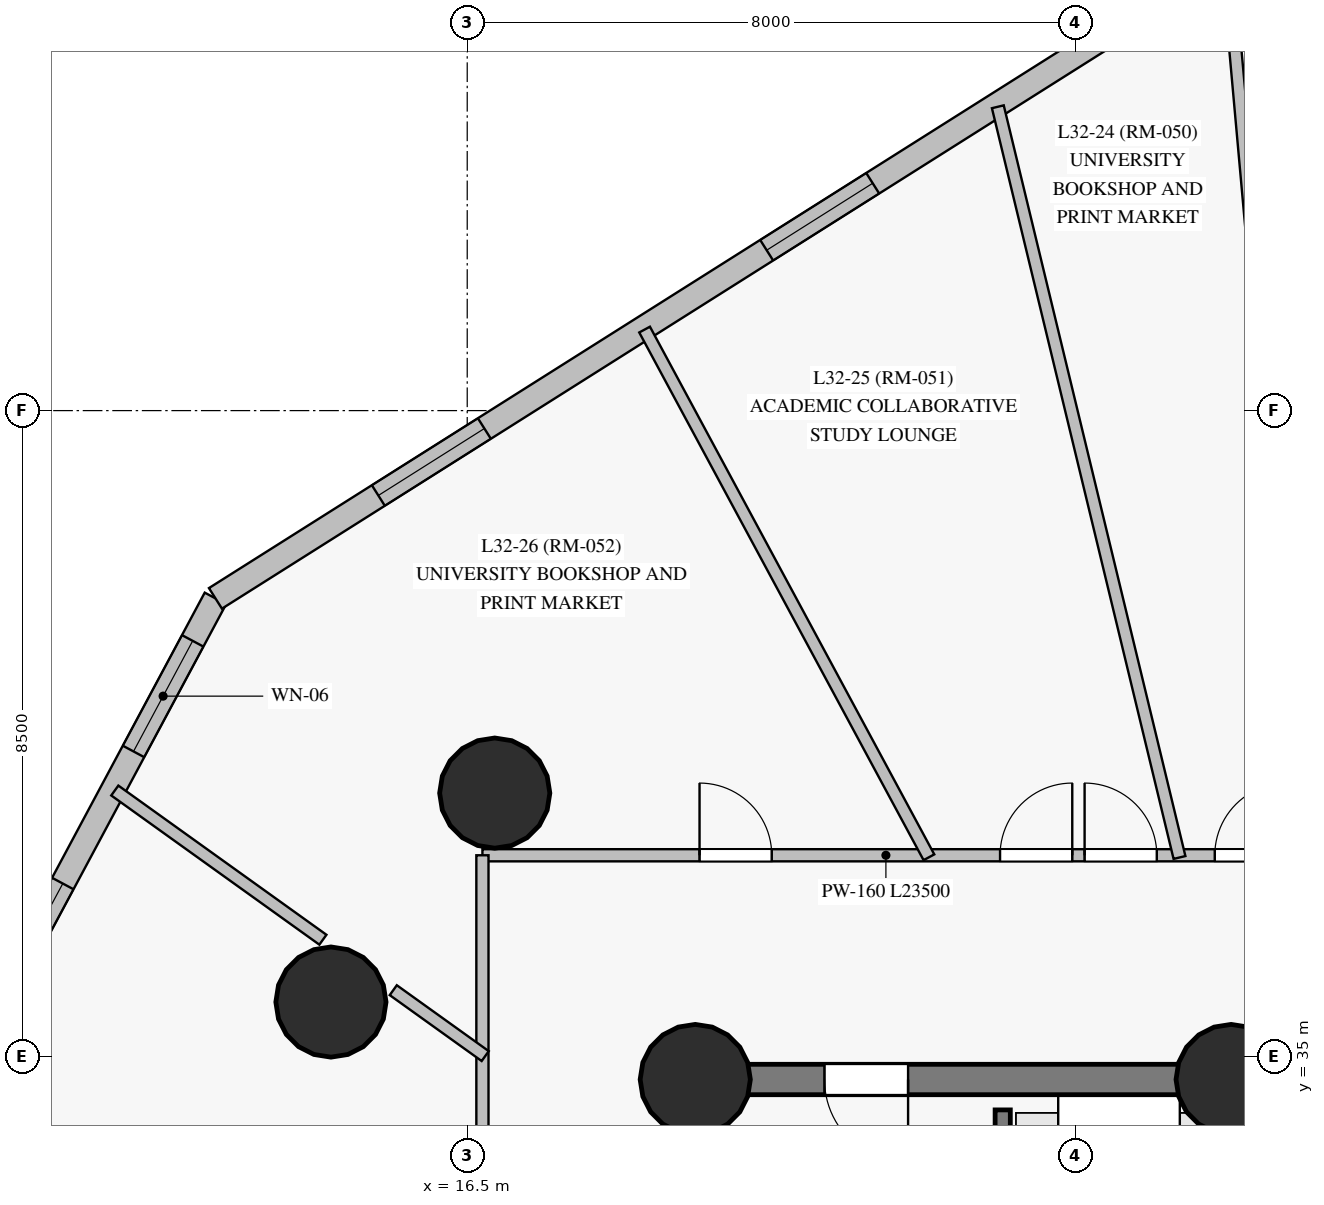
"""IFC4 building model, lengths in metres.
Left out: names, types, materials, properties, quantities, classifications, styles, units other than length and angle.
Written with IfcOpenShell. Run it as: python <this file> out.ifc"""

import sys

from ifc_helpers import new_model, si_unit, direction, frame, frame_2d, origin, origin_with_axes, origin_2d, place, context, subcontext, project, spatial, rectangle, circle, extrude, source, transform, mapped, element, fill, save


model = new_model("IFC4")
c1 = context("Model", 3, precision=1e-05, world=origin(), true_north=direction((0.0, 1.0)))
c2 = subcontext(c1, "Body", "Model", "MODEL_VIEW")
j1 = project(units=[si_unit("LENGTHUNIT", "METRE"), si_unit("PLANEANGLEUNIT", "RADIAN")], contexts=[c1])
p1 = place(None, origin())
s1 = spatial("IfcSite", under=j1, at=p1, CompositionType="ELEMENT")
p2 = place(p1, origin())
s2 = spatial("IfcBuilding", under=s1, at=p2, CompositionType="ELEMENT")
p3 = place(p2, frame((0.0, 0.0, 117.55)))
s3 = spatial("IfcBuildingStorey", under=s2, at=p3, CompositionType="ELEMENT", Elevation=117.55)
p4 = place(p3, frame((37.5, 34.7, 0.0), z_axis=(0.0, 0.0, 1.0), x_axis=(-1.0, 0.0, 0.0)))
e1 = element("IfcWall", 1, at=p4, inside=s3, PredefinedType="SHEAR", context=c2, shape_type="SweptSolid", body=[
    extrude(rectangle(XDim=10.95, YDim=0.4, at=frame_2d((5.475, 0.0))), origin(), (0.0, 0.0, 1.0), 2.825),
])
p5 = place(p4, frame((2.15, 0.0, 0.0)))
e2 = element("IfcOpeningElement", 2, at=p5, cuts=e1, PredefinedType="OPENING", context=c2, shape_type="SweptSolid", body=[
    extrude(rectangle(XDim=1.2, YDim=2.15, at=frame_2d((0.6, 1.075))), frame((0.0, 0.21, 0.0), z_axis=(0.0, -1.0, 0.0), x_axis=(1.0, 0.0, 0.0)), (0.0, 0.0, 1.0), 0.42),
])
p6 = place(p4, frame((6.35, 0.0, 0.0)))
e3 = element("IfcOpeningElement", 3, at=p6, cuts=e1, PredefinedType="OPENING", context=c2, shape_type="SweptSolid", body=[
    extrude(rectangle(XDim=1.1, YDim=2.15, at=frame_2d((0.55, 1.075))), frame((0.0, 0.21, 0.0), z_axis=(0.0, -1.0, 0.0), x_axis=(1.0, 0.0, 0.0)), (0.0, 0.0, 1.0), 0.42),
])
p7 = place(p3, frame((26.55, 34.7, 0.0), z_axis=(0.0, 0.0, 1.0), x_axis=(-1.0, 0.0, 0.0)))
e4 = element("IfcWall", 4, at=p7, inside=s3, PredefinedType="SHEAR", context=c2, shape_type="SweptSolid", body=[
    extrude(rectangle(XDim=7.05, YDim=0.4, at=frame_2d((3.525, 0.0))), origin(), (0.0, 0.0, 1.0), 2.825),
])
p8 = place(p7, frame((4.25, 0.0, 0.0)))
e5 = element("IfcOpeningElement", 5, at=p8, cuts=e4, PredefinedType="OPENING", context=c2, shape_type="SweptSolid", body=[
    extrude(rectangle(XDim=1.1, YDim=2.15, at=frame_2d((0.55, 1.075))), frame((0.0, 0.21, 0.0), z_axis=(0.0, -1.0, 0.0), x_axis=(1.0, 0.0, 0.0)), (0.0, 0.0, 1.0), 0.42),
])
p9 = place(p3, frame((19.5, 34.7, 0.0), z_axis=(0.0, 0.0, 1.0), x_axis=(0.0, -1.0, 0.0)))
e6 = element("IfcWall", 6, at=p9, inside=s3, PredefinedType="SHEAR", context=c2, shape_type="SweptSolid", body=[
    extrude(rectangle(XDim=16.4, YDim=0.4, at=frame_2d((8.2, 0.0))), origin(), (0.0, 0.0, 1.0), 2.825),
])
p10 = place(p9, frame((3.1, 0.0, 0.0)))
e7 = element("IfcOpeningElement", 7, at=p10, cuts=e6, PredefinedType="OPENING", context=c2, shape_type="SweptSolid", body=[
    extrude(rectangle(XDim=1.1, YDim=2.15, at=frame_2d((0.55, 1.075))), frame((0.0, 0.21, 0.0), z_axis=(0.0, -1.0, 0.0), x_axis=(1.0, 0.0, 0.0)), (0.0, 0.0, 1.0), 0.42),
])
m1 = source(origin_with_axes(), c2, "Body", "SweptSolid", [
    extrude(circle(Radius=0.725, at=origin_2d()), origin(), (0.0, 0.0, 1.0), 3.05),
])
for number, where, z_axis, x_axis in (
    (8, (19.5, 34.7, 0.0), (0.0, 0.0, 1.0), (1.0, 0.0, 0.0)),
    (9, (26.55, 34.7, 0.0), (0.0, 0.0, 1.0), (1.0, 0.0, 0.0)),
    (10, (16.862, 38.468, 0.0), (0.0, 0.0, 1.0), (1.0, 0.0, 0.0)),
    (11, (14.707, 35.719, 0.0), (0.0, 0.0, 1.0), (1.0, 0.0, 0.0)),
):
    element("IfcColumn", number, at=place(p3, frame(where, z_axis=z_axis, x_axis=x_axis)), inside=s3, PredefinedType="COLUMN", context=c2, shape_type="MappedRepresentation", body=[
        mapped(m1, transform((0.0, 0.0, 0.0), scale=1.0)),
    ])
p11 = place(p3, frame((13.188, 41.03, 0.0), z_axis=(0.0, 0.0, 1.0), x_axis=(-0.471928958931, -0.881636579165, 0.0)))
e12 = element("IfcWall", 12, at=p11, inside=s3, PredefinedType="SOLIDWALL", context=c2, shape_type="SweptSolid", body=[
    extrude(rectangle(XDim=11.167, YDim=0.32, at=frame_2d((5.583, 0.0))), origin(), (0.0, 0.0, 1.0), 2.825),
])
p12 = place(p11, frame((0.634, 0.0, 0.85)))
e13 = element("IfcOpeningElement", 13, at=p12, cuts=e12, PredefinedType="OPENING", context=c2, shape_type="SweptSolid", body=[
    extrude(rectangle(XDim=1.65, YDim=1.65, at=frame_2d((0.825, 0.825))), frame((0.0, 0.17, 0.0), z_axis=(0.0, -1.0, 0.0), x_axis=(1.0, 0.0, 0.0)), (0.0, 0.0, 1.0), 0.34),
])
p13 = place(p11, frame((4.255, 0.0, 0.85)))
e14 = element("IfcOpeningElement", 14, at=p13, cuts=e12, PredefinedType="OPENING", context=c2, shape_type="SweptSolid", body=[
    extrude(rectangle(XDim=1.65, YDim=1.65, at=frame_2d((0.825, 0.825))), frame((0.0, 0.17, 0.0), z_axis=(0.0, -1.0, 0.0), x_axis=(1.0, 0.0, 0.0)), (0.0, 0.0, 1.0), 0.34),
])
p14 = place(p11, frame((8.06, 0.0, 0.85)))
e15 = element("IfcOpeningElement", 15, at=p14, cuts=e12, PredefinedType="OPENING", context=c2, shape_type="SweptSolid", body=[
    extrude(rectangle(XDim=1.65, YDim=1.65, at=frame_2d((0.825, 0.825))), frame((0.0, 0.17, 0.0), z_axis=(0.0, -1.0, 0.0), x_axis=(1.0, 0.0, 0.0)), (0.0, 0.0, 1.0), 0.34),
])
p15 = place(p3, frame((24.967, 48.469, 0.0), z_axis=(0.0, 0.0, 1.0), x_axis=(-0.845484322543, -0.534000243758, 0.0)))
e16 = element("IfcWall", 16, at=p15, inside=s3, PredefinedType="SOLIDWALL", context=c2, shape_type="SweptSolid", body=[
    extrude(rectangle(XDim=13.932, YDim=0.32, at=frame_2d((6.966, 0.0))), origin(), (0.0, 0.0, 1.0), 2.825),
])
p16 = place(p15, frame((3.705, 0.0, 0.85)))
e17 = element("IfcOpeningElement", 17, at=p16, cuts=e16, PredefinedType="OPENING", context=c2, shape_type="SweptSolid", body=[
    extrude(rectangle(XDim=1.65, YDim=1.65, at=frame_2d((0.825, 0.825))), frame((0.0, 0.17, 0.0), z_axis=(0.0, -1.0, 0.0), x_axis=(1.0, 0.0, 0.0)), (0.0, 0.0, 1.0), 0.34),
])
p17 = place(p15, frame((9.747, 0.0, 0.85)))
e18 = element("IfcOpeningElement", 18, at=p17, cuts=e16, PredefinedType="OPENING", context=c2, shape_type="SweptSolid", body=[
    extrude(rectangle(XDim=1.65, YDim=1.65, at=frame_2d((0.825, 0.825))), frame((0.0, 0.17, 0.0), z_axis=(0.0, -1.0, 0.0), x_axis=(1.0, 0.0, 0.0)), (0.0, 0.0, 1.0), 0.34),
])
p18 = place(p3, frame((23.545, 18.7, 0.0), z_axis=(0.0, 0.0, 1.0), x_axis=(0.0, 1.0, 0.0)))
e19 = element("IfcWall", 19, at=p18, inside=s3, PredefinedType="SHEAR", context=c2, shape_type="SweptSolid", body=[
    extrude(rectangle(XDim=15.6, YDim=0.2, at=frame_2d((7.8, 0.0))), origin(), (0.0, 0.0, 1.0), 2.825),
])
p19 = place(p18, frame((2.75, 0.0, 0.0)))
e20 = element("IfcOpeningElement", 20, at=p19, cuts=e19, PredefinedType="OPENING", context=c2, shape_type="SweptSolid", body=[
    extrude(rectangle(XDim=1.15, YDim=2.15, at=frame_2d((0.575, 1.075))), frame((0.0, 0.11, 0.0), z_axis=(0.0, -1.0, 0.0), x_axis=(1.0, 0.0, 0.0)), (0.0, 0.0, 1.0), 0.22),
])
p20 = place(p18, frame((0.14, 0.0, 0.0)))
e21 = element("IfcOpeningElement", 21, at=p20, cuts=e19, PredefinedType="OPENING", context=c2, shape_type="SweptSolid", body=[
    extrude(rectangle(XDim=0.88, YDim=2.1, at=frame_2d((0.44, 1.05))), frame((0.0, 0.11, 0.0), z_axis=(0.0, -1.0, 0.0), x_axis=(1.0, 0.0, 0.0)), (0.0, 0.0, 1.0), 0.22),
])
p21 = place(p18, frame((1.36, 0.0, 0.0)))
e22 = element("IfcOpeningElement", 22, at=p21, cuts=e19, PredefinedType="OPENING", context=c2, shape_type="SweptSolid", body=[
    extrude(rectangle(XDim=0.88, YDim=2.1, at=frame_2d((0.44, 1.05))), frame((0.0, 0.11, 0.0), z_axis=(0.0, -1.0, 0.0), x_axis=(1.0, 0.0, 0.0)), (0.0, 0.0, 1.0), 0.22),
])
p22 = place(p18, frame((12.1, 0.0, 0.0)))
e23 = element("IfcOpeningElement", 23, at=p22, cuts=e19, PredefinedType="OPENING", context=c2, shape_type="SweptSolid", body=[
    extrude(rectangle(XDim=1.12, YDim=2.15, at=frame_2d((0.56, 1.075))), frame((0.0, 0.11, 0.0), z_axis=(0.0, -1.0, 0.0), x_axis=(1.0, 0.0, 0.0)), (0.0, 0.0, 1.0), 0.22),
])
p23 = place(p18, frame((14.05, 0.0, 0.0)))
e24 = element("IfcOpeningElement", 24, at=p23, cuts=e19, PredefinedType="OPENING", context=c2, shape_type="SweptSolid", body=[
    extrude(rectangle(XDim=1.12, YDim=2.15, at=frame_2d((0.56, 1.075))), frame((0.0, 0.11, 0.0), z_axis=(0.0, -1.0, 0.0), x_axis=(1.0, 0.0, 0.0)), (0.0, 0.0, 1.0), 0.22),
])
p24 = place(p3, frame((26.52, 30.42, 0.0), z_axis=(0.0, 0.0, 1.0), x_axis=(0.0, 1.0, 0.0)))
e25 = element("IfcWall", 25, at=p24, inside=s3, PredefinedType="SHEAR", context=c2, shape_type="SweptSolid", body=[
    extrude(rectangle(XDim=3.86, YDim=0.2, at=frame_2d((1.93, 0.0))), origin(), (0.0, 0.0, 1.0), 2.825),
])
p25 = place(p3, frame((16.7, 37.65, 0.0), z_axis=(0.0, 0.0, 1.0), x_axis=(1.0, 0.0, 0.0)))
e26 = element("IfcWall", 26, at=p25, inside=s3, PredefinedType="PARTITIONING", context=c2, shape_type="SweptSolid", body=[
    extrude(rectangle(XDim=23.5, YDim=0.16, at=frame_2d((11.75, 0.0))), origin(), (0.0, 0.0, 1.0), 2.325),
])
p26 = place(p25, frame((20.526, 0.0, 0.0)))
e27 = element("IfcOpeningElement", 27, at=p26, cuts=e26, PredefinedType="OPENING", context=c2, shape_type="SweptSolid", body=[
    extrude(rectangle(XDim=0.95, YDim=2.15, at=frame_2d((0.475, 1.075))), frame((0.0, 0.09, 0.0), z_axis=(0.0, -1.0, 0.0), x_axis=(1.0, 0.0, 0.0)), (0.0, 0.0, 1.0), 0.18),
])
p27 = place(p25, frame((17.997, 0.0, 0.0)))
e28 = element("IfcOpeningElement", 28, at=p27, cuts=e26, PredefinedType="OPENING", context=c2, shape_type="SweptSolid", body=[
    extrude(rectangle(XDim=0.95, YDim=2.15, at=frame_2d((0.475, 1.075))), frame((0.0, 0.09, 0.0), z_axis=(0.0, -1.0, 0.0), x_axis=(1.0, 0.0, 0.0)), (0.0, 0.0, 1.0), 0.18),
])
p28 = place(p25, frame((14.26, 0.0, 0.0)))
e29 = element("IfcOpeningElement", 29, at=p28, cuts=e26, PredefinedType="OPENING", context=c2, shape_type="SweptSolid", body=[
    extrude(rectangle(XDim=0.95, YDim=2.15, at=frame_2d((0.475, 1.075))), frame((0.0, 0.09, 0.0), z_axis=(0.0, -1.0, 0.0), x_axis=(1.0, 0.0, 0.0)), (0.0, 0.0, 1.0), 0.18),
])
p29 = place(p25, frame((13.256, 0.0, 0.0)))
e30 = element("IfcOpeningElement", 30, at=p29, cuts=e26, PredefinedType="OPENING", context=c2, shape_type="SweptSolid", body=[
    extrude(rectangle(XDim=0.86, YDim=2.1, at=frame_2d((0.43, 1.05))), frame((0.0, 0.09, 0.0), z_axis=(0.0, -1.0, 0.0), x_axis=(1.0, 0.0, 0.0)), (0.0, 0.0, 1.0), 0.18),
])
p30 = place(p25, frame((11.56, 0.0, 0.0)))
e31 = element("IfcOpeningElement", 31, at=p30, cuts=e26, PredefinedType="OPENING", context=c2, shape_type="SweptSolid", body=[
    extrude(rectangle(XDim=0.95, YDim=2.15, at=frame_2d((0.475, 1.075))), frame((0.0, 0.09, 0.0), z_axis=(0.0, -1.0, 0.0), x_axis=(1.0, 0.0, 0.0)), (0.0, 0.0, 1.0), 0.18),
])
p31 = place(p25, frame((9.635, 0.0, 0.0)))
e32 = element("IfcOpeningElement", 32, at=p31, cuts=e26, PredefinedType="OPENING", context=c2, shape_type="SweptSolid", body=[
    extrude(rectangle(XDim=0.95, YDim=2.15, at=frame_2d((0.475, 1.075))), frame((0.0, 0.09, 0.0), z_axis=(0.0, -1.0, 0.0), x_axis=(1.0, 0.0, 0.0)), (0.0, 0.0, 1.0), 0.18),
])
p32 = place(p25, frame((7.922, 0.0, 0.0)))
e33 = element("IfcOpeningElement", 33, at=p32, cuts=e26, PredefinedType="OPENING", context=c2, shape_type="SweptSolid", body=[
    extrude(rectangle(XDim=0.95, YDim=2.15, at=frame_2d((0.475, 1.075))), frame((0.0, 0.09, 0.0), z_axis=(0.0, -1.0, 0.0), x_axis=(1.0, 0.0, 0.0)), (0.0, 0.0, 1.0), 0.18),
])
p33 = place(p25, frame((6.81, 0.0, 0.0)))
e34 = element("IfcOpeningElement", 34, at=p33, cuts=e26, PredefinedType="OPENING", context=c2, shape_type="SweptSolid", body=[
    extrude(rectangle(XDim=0.95, YDim=2.15, at=frame_2d((0.475, 1.075))), frame((0.0, 0.09, 0.0), z_axis=(0.0, -1.0, 0.0), x_axis=(1.0, 0.0, 0.0)), (0.0, 0.0, 1.0), 0.18),
])
p34 = place(p25, frame((2.856, 0.0, 0.0)))
e35 = element("IfcOpeningElement", 35, at=p34, cuts=e26, PredefinedType="OPENING", context=c2, shape_type="SweptSolid", body=[
    extrude(rectangle(XDim=0.95, YDim=2.15, at=frame_2d((0.475, 1.075))), frame((0.0, 0.09, 0.0), z_axis=(0.0, -1.0, 0.0), x_axis=(1.0, 0.0, 0.0)), (0.0, 0.0, 1.0), 0.18),
])
p35 = place(p3, frame((16.7, 15.35, 0.0), z_axis=(0.0, 0.0, 1.0), x_axis=(0.0, 1.0, 0.0)))
e36 = element("IfcWall", 36, at=p35, inside=s3, PredefinedType="PARTITIONING", context=c2, shape_type="SweptSolid", body=[
    extrude(rectangle(XDim=22.3, YDim=0.16, at=frame_2d((11.15, 0.0))), origin(), (0.0, 0.0, 1.0), 2.225),
])
p36 = place(p35, frame((10.675, 0.0, 0.0)))
e37 = element("IfcOpeningElement", 37, at=p36, cuts=e36, PredefinedType="OPENING", context=c2, shape_type="SweptSolid", body=[
    extrude(rectangle(XDim=0.95, YDim=2.15, at=frame_2d((0.475, 1.075))), frame((0.0, 0.09, 0.0), z_axis=(0.0, -1.0, 0.0), x_axis=(1.0, 0.0, 0.0)), (0.0, 0.0, 1.0), 0.18),
])
p37 = place(p35, frame((0.963, 0.0, 0.0)))
e38 = element("IfcOpeningElement", 38, at=p37, cuts=e36, PredefinedType="OPENING", context=c2, shape_type="SweptSolid", body=[
    extrude(rectangle(XDim=0.95, YDim=2.15, at=frame_2d((0.475, 1.075))), frame((0.0, 0.09, 0.0), z_axis=(0.0, -1.0, 0.0), x_axis=(1.0, 0.0, 0.0)), (0.0, 0.0, 1.0), 0.18),
])
p38 = place(p35, frame((14.02, 0.0, 0.0)))
e39 = element("IfcOpeningElement", 39, at=p38, cuts=e36, PredefinedType="OPENING", context=c2, shape_type="SweptSolid", body=[
    extrude(rectangle(XDim=0.95, YDim=2.15, at=frame_2d((0.475, 1.075))), frame((0.0, 0.09, 0.0), z_axis=(0.0, -1.0, 0.0), x_axis=(1.0, 0.0, 0.0)), (0.0, 0.0, 1.0), 0.18),
])
p39 = place(p3, frame((27.562, 37.605, 0.0), z_axis=(0.0, 0.0, 1.0), x_axis=(-0.089503626706, 0.995986496297, 0.0)))
e40 = element("IfcWall", 40, at=p39, inside=s3, PredefinedType="PARTITIONING", context=c2, shape_type="SweptSolid", body=[
    extrude(rectangle(XDim=11.091, YDim=0.16, at=frame_2d((5.545, 0.0))), origin(), (0.0, 0.0, 1.0), 2.225),
])
p40 = place(p3, frame((25.871, 37.621, 0.0), z_axis=(0.0, 0.0, 1.0), x_axis=(-0.235190853666, 0.971949207702, 0.0)))
e41 = element("IfcWall", 41, at=p40, inside=s3, PredefinedType="PARTITIONING", context=c2, shape_type="SweptSolid", body=[
    extrude(rectangle(XDim=10.162, YDim=0.16, at=frame_2d((5.081, 0.0))), origin(), (0.0, 0.0, 1.0), 2.825),
])
p41 = place(p3, frame((22.574, 37.624, 0.0), z_axis=(0.0, 0.0, 1.0), x_axis=(-0.474347188847, 0.880337858116, 0.0)))
e42 = element("IfcWall", 42, at=p41, inside=s3, PredefinedType="PARTITIONING", context=c2, shape_type="SweptSolid", body=[
    extrude(rectangle(XDim=7.886, YDim=0.16, at=frame_2d((3.943, 0.0))), origin(), (0.0, 0.0, 1.0), 2.825),
])
p42 = place(p3, frame((14.601, 36.539, 0.0), z_axis=(0.0, 0.0, 1.0), x_axis=(-0.812679267744, 0.582711255923, 0.0)))
e43 = element("IfcWall", 43, at=p42, inside=s3, PredefinedType="PARTITIONING", context=c2, shape_type="SweptSolid", body=[
    extrude(rectangle(XDim=3.369, YDim=0.16, at=frame_2d((1.684, 0.0))), origin(), (0.0, 0.0, 1.0), 2.825),
])
p43 = place(p3, frame((16.737, 35.008, 0.0), z_axis=(0.0, 0.0, 1.0), x_axis=(-0.812690241853, 0.582695950558, 0.0)))
e44 = element("IfcWall", 44, at=p43, inside=s3, PredefinedType="PARTITIONING", context=c2, shape_type="SweptSolid", body=[
    extrude(rectangle(XDim=1.488, YDim=0.16, at=frame_2d((0.744, 0.0))), origin(), (0.0, 0.0, 1.0), 2.225),
])
m2 = source(origin_with_axes(), c2, "Body", "SweptSolid", [
    extrude(rectangle(XDim=1.65, YDim=1.65, at=frame_2d((0.825, 0.825))), frame((0.0, 0.03, 0.0), z_axis=(0.0, -1.0, 0.0), x_axis=(1.0, 0.0, 0.0)), (0.0, 0.0, 1.0), 0.06),
])
p44 = place(p12, origin())
e45 = element("IfcWindow", 45, at=p44, inside=s3, PartitioningType="SINGLE_PANEL", PredefinedType="WINDOW", context=c2, shape_type="MappedRepresentation", body=[
    mapped(m2, transform((0.0, 0.0, 0.0), scale=1.0)),
])
fill(e13, e45)
p45 = place(p13, origin())
e46 = element("IfcWindow", 46, at=p45, inside=s3, PartitioningType="SINGLE_PANEL", PredefinedType="WINDOW", context=c2, shape_type="MappedRepresentation", body=[
    mapped(m2, transform((0.0, 0.0, 0.0), scale=1.0)),
])
fill(e14, e46)
p46 = place(p16, origin())
e47 = element("IfcWindow", 47, at=p46, inside=s3, PartitioningType="SINGLE_PANEL", PredefinedType="WINDOW", context=c2, shape_type="MappedRepresentation", body=[
    mapped(m2, transform((0.0, 0.0, 0.0), scale=1.0)),
])
fill(e17, e47)
p47 = place(p17, origin())
e48 = element("IfcWindow", 48, at=p47, inside=s3, PartitioningType="SINGLE_PANEL", PredefinedType="WINDOW", context=c2, shape_type="MappedRepresentation", body=[
    mapped(m2, transform((0.0, 0.0, 0.0), scale=1.0)),
])
fill(e18, e48)
m3 = source(origin_with_axes(), c2, "Body", "SweptSolid", [
    extrude(rectangle(XDim=1.1, YDim=2.15, at=frame_2d((0.55, 1.075))), frame((0.0, 0.025, 0.0), z_axis=(0.0, -1.0, 0.0), x_axis=(1.0, 0.0, 0.0)), (0.0, 0.0, 1.0), 0.05),
])
p48 = place(p8, origin())
e49 = element("IfcDoor", 49, at=p48, inside=s3, OperationType="SINGLE_SWING_LEFT", PredefinedType="DOOR", context=c2, shape_type="MappedRepresentation", body=[
    mapped(m3, transform((0.0, 0.0, 0.0), scale=1.0)),
])
fill(e5, e49)
m4 = source(origin_with_axes(), c2, "Body", "SweptSolid", [
    extrude(rectangle(XDim=0.95, YDim=2.15, at=frame_2d((0.475, 1.075))), frame((0.0, 0.025, 0.0), z_axis=(0.0, -1.0, 0.0), x_axis=(1.0, 0.0, 0.0)), (0.0, 0.0, 1.0), 0.05),
])
p49 = place(p31, origin())
e50 = element("IfcDoor", 50, at=p49, inside=s3, OperationType="SINGLE_SWING_RIGHT", PredefinedType="DOOR", context=c2, shape_type="MappedRepresentation", body=[
    mapped(m4, transform((0.0, 0.0, 0.0), scale=1.0)),
])
fill(e32, e50)
p50 = place(p32, origin())
e51 = element("IfcDoor", 51, at=p50, inside=s3, OperationType="SINGLE_SWING_LEFT", PredefinedType="DOOR", context=c2, shape_type="MappedRepresentation", body=[
    mapped(m4, transform((0.0, 0.0, 0.0), scale=1.0)),
])
fill(e33, e51)
p51 = place(p33, origin())
e52 = element("IfcDoor", 52, at=p51, inside=s3, OperationType="SINGLE_SWING_RIGHT", PredefinedType="DOOR", context=c2, shape_type="MappedRepresentation", body=[
    mapped(m4, transform((0.0, 0.0, 0.0), scale=1.0)),
])
fill(e34, e52)
p52 = place(p34, origin())
e53 = element("IfcDoor", 53, at=p52, inside=s3, OperationType="SINGLE_SWING_LEFT", PredefinedType="DOOR", context=c2, shape_type="MappedRepresentation", body=[
    mapped(m4, transform((0.0, 0.0, 0.0), scale=1.0)),
])
fill(e35, e53)
save(model, sys.argv[1])
